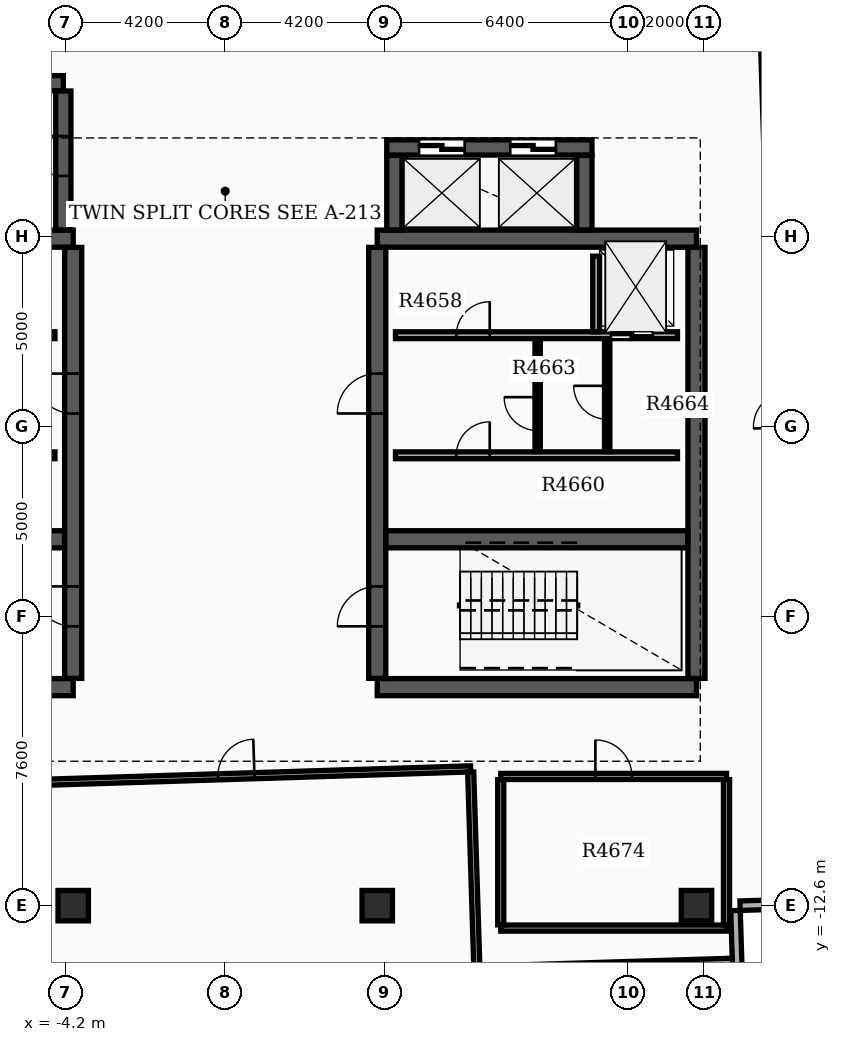
"""IFC4 building model, lengths in metres.
Left out: names, types, materials, properties, quantities, classifications, styles, units other than length and angle.
Written with IfcOpenShell. Run it as: python <this file> out.ifc"""

import sys

from ifc_helpers import new_model, si_unit, direction, frame, frame_2d, origin, origin_2d, place, context, subcontext, project, spatial, rectangle, extrude, element, fill, save


model = new_model("IFC4")
c1 = context("Model", 3, precision=1e-05, world=origin(), true_north=direction((0.0, 1.0)))
c2 = subcontext(c1, "Body", "Model", "MODEL_VIEW")
j1 = project(units=[si_unit("LENGTHUNIT", "METRE"), si_unit("PLANEANGLEUNIT", "RADIAN")], contexts=[c1])
p1 = place(None, origin())
s1 = spatial("IfcSite", under=j1, at=p1, CompositionType="ELEMENT")
p2 = place(p1, origin())
s2 = spatial("IfcBuilding", under=s1, at=p2, CompositionType="ELEMENT")
p3 = place(p2, frame((0.0, 0.0, 299.4)))
s3 = spatial("IfcBuildingStorey", under=s2, at=p3, CompositionType="ELEMENT", Elevation=299.4)
for number, where, z_axis, x_axis in (
    (1, (-12.4, -6.85, 0.0), (0.0, 0.0, 1.0), (1.0, 0.0, 0.0)),
    (2, (-12.4, 4.95, 0.0), (0.0, 0.0, 1.0), (1.0, 0.0, 0.0)),
):
    element("IfcWall", number, at=place(p3, frame(where, z_axis=z_axis, x_axis=x_axis)), inside=s3, PredefinedType="SHEAR", context=c2, shape_type="SweptSolid", body=[
        extrude(rectangle(XDim=8.4, YDim=0.45, at=frame_2d((4.2, 0.0))), origin(), (0.0, 0.0, 1.0), 4.25),
    ])
p4 = place(p3, frame((-4.0, -6.62, 0.0), z_axis=(0.0, 0.0, 1.0), x_axis=(0.0, 1.0, 0.0)))
e3 = element("IfcWall", 3, at=p4, inside=s3, PredefinedType="SHEAR", context=c2, shape_type="SweptSolid", body=[
    extrude(rectangle(XDim=11.34, YDim=0.45, at=frame_2d((5.67, 0.0))), origin(), (0.0, 0.0, 1.0), 4.25),
])
p5 = place(p4, frame((1.37, 0.0, 0.0)))
e4 = element("IfcOpeningElement", 4, at=p5, cuts=e3, PredefinedType="OPENING", context=c2, shape_type="SweptSolid", body=[
    extrude(rectangle(XDim=1.05, YDim=2.15, at=frame_2d((0.525, 1.075))), frame((0.0, 0.235, 0.0), z_axis=(0.0, -1.0, 0.0), x_axis=(1.0, 0.0, 0.0)), (0.0, 0.0, 1.0), 0.47),
])
p6 = place(p4, frame((6.97, 0.0, 0.0)))
e5 = element("IfcOpeningElement", 5, at=p6, cuts=e3, PredefinedType="OPENING", context=c2, shape_type="SweptSolid", body=[
    extrude(rectangle(XDim=1.05, YDim=2.15, at=frame_2d((0.525, 1.075))), frame((0.0, 0.235, 0.0), z_axis=(0.0, -1.0, 0.0), x_axis=(1.0, 0.0, 0.0)), (0.0, 0.0, 1.0), 0.47),
])
p7 = place(p3, frame((-12.17, -2.96, 0.0), z_axis=(0.0, 0.0, 1.0), x_axis=(1.0, 0.0, 0.0)))
e6 = element("IfcWall", 6, at=p7, inside=s3, PredefinedType="SHEAR", context=c2, shape_type="SweptSolid", body=[
    extrude(rectangle(XDim=7.94, YDim=0.45, at=frame_2d((3.97, 0.0))), origin(), (0.0, 0.0, 1.0), 4.25),
])
for number, where, z_axis, x_axis in (
    (7, (4.0, -6.85, 0.0), (0.0, 0.0, 1.0), (1.0, 0.0, 0.0)),
    (8, (4.0, 4.95, 0.0), (0.0, 0.0, 1.0), (1.0, 0.0, 0.0)),
):
    element("IfcWall", number, at=place(p3, frame(where, z_axis=z_axis, x_axis=x_axis)), inside=s3, PredefinedType="SHEAR", context=c2, shape_type="SweptSolid", body=[
        extrude(rectangle(XDim=8.4, YDim=0.45, at=frame_2d((4.2, 0.0))), origin(), (0.0, 0.0, 1.0), 4.25),
    ])
p8 = place(p3, frame((4.0, -6.62, 0.0), z_axis=(0.0, 0.0, 1.0), x_axis=(0.0, 1.0, 0.0)))
e9 = element("IfcWall", 9, at=p8, inside=s3, PredefinedType="SHEAR", context=c2, shape_type="SweptSolid", body=[
    extrude(rectangle(XDim=11.34, YDim=0.45, at=frame_2d((5.67, 0.0))), origin(), (0.0, 0.0, 1.0), 4.25),
])
p9 = place(p8, frame((1.37, 0.0, 0.0)))
e10 = element("IfcOpeningElement", 10, at=p9, cuts=e9, PredefinedType="OPENING", context=c2, shape_type="SweptSolid", body=[
    extrude(rectangle(XDim=1.05, YDim=2.15, at=frame_2d((0.525, 1.075))), frame((0.0, 0.235, 0.0), z_axis=(0.0, -1.0, 0.0), x_axis=(1.0, 0.0, 0.0)), (0.0, 0.0, 1.0), 0.47),
])
p10 = place(p8, frame((6.97, 0.0, 0.0)))
e11 = element("IfcOpeningElement", 11, at=p10, cuts=e9, PredefinedType="OPENING", context=c2, shape_type="SweptSolid", body=[
    extrude(rectangle(XDim=1.05, YDim=2.15, at=frame_2d((0.525, 1.075))), frame((0.0, 0.235, 0.0), z_axis=(0.0, -1.0, 0.0), x_axis=(1.0, 0.0, 0.0)), (0.0, 0.0, 1.0), 0.47),
])
p11 = place(p3, frame((12.4, -6.62, 0.0), z_axis=(0.0, 0.0, 1.0), x_axis=(0.0, 1.0, 0.0)))
e12 = element("IfcWall", 12, at=p11, inside=s3, PredefinedType="SHEAR", context=c2, shape_type="SweptSolid", body=[
    extrude(rectangle(XDim=11.34, YDim=0.45, at=frame_2d((5.67, 0.0))), origin(), (0.0, 0.0, 1.0), 4.25),
])
p12 = place(p3, frame((4.23, -2.96, 0.0), z_axis=(0.0, 0.0, 1.0), x_axis=(1.0, 0.0, 0.0)))
e13 = element("IfcWall", 13, at=p12, inside=s3, PredefinedType="SHEAR", context=c2, shape_type="SweptSolid", body=[
    extrude(rectangle(XDim=7.94, YDim=0.45, at=frame_2d((3.97, 0.0))), origin(), (0.0, 0.0, 1.0), 4.25),
])
p13 = place(p3, frame((-12.22, 9.04, 0.0), z_axis=(0.0, 0.0, 1.0), x_axis=(1.0, 0.0, 0.0)))
e14 = element("IfcWall", 14, at=p13, inside=s3, PredefinedType="SHEAR", context=c2, shape_type="SweptSolid", body=[
    extrude(rectangle(XDim=7.96, YDim=0.4, at=frame_2d((3.98, 0.0))), origin(), (0.0, 0.0, 1.0), 4.25),
])
p14 = place(p3, frame((-4.26, 5.18, 0.0), z_axis=(0.0, 0.0, 1.0), x_axis=(0.0, 1.0, 0.0)))
e15 = element("IfcWall", 15, at=p14, inside=s3, PredefinedType="SHEAR", context=c2, shape_type="SweptSolid", body=[
    extrude(rectangle(XDim=3.655, YDim=0.4, at=frame_2d((1.828, 0.0))), origin(), (0.0, 0.0, 1.0), 4.25),
])
p15 = place(p14, frame((1.42, 0.0, 0.0)))
e16 = element("IfcOpeningElement", 16, at=p15, cuts=e15, PredefinedType="OPENING", context=c2, shape_type="SweptSolid", body=[
    extrude(rectangle(XDim=1.05, YDim=2.15, at=frame_2d((0.525, 1.075))), frame((0.0, 0.21, 0.0), z_axis=(0.0, -1.0, 0.0), x_axis=(1.0, 0.0, 0.0)), (0.0, 0.0, 1.0), 0.42),
])
p16 = place(p3, frame((4.45, 5.18, 0.0), z_axis=(0.0, 0.0, 1.0), x_axis=(0.0, 1.0, 0.0)))
e17 = element("IfcWall", 17, at=p16, inside=s3, PredefinedType="SHEAR", context=c2, shape_type="SweptSolid", body=[
    extrude(rectangle(XDim=1.96, YDim=0.4, at=frame_2d((0.98, 0.0))), origin(), (0.0, 0.0, 1.0), 4.25),
])
p17 = place(p3, frame((4.25, 7.35, 0.0), z_axis=(0.0, 0.0, 1.0), x_axis=(1.0, 0.0, 0.0)))
e18 = element("IfcWall", 18, at=p17, inside=s3, PredefinedType="SHEAR", context=c2, shape_type="SweptSolid", body=[
    extrude(rectangle(XDim=5.4, YDim=0.4, at=frame_2d((2.7, 0.0))), origin(), (0.0, 0.0, 1.0), 4.25),
])
p18 = place(p17, frame((0.85, 0.0, 0.0)))
e19 = element("IfcOpeningElement", 19, at=p18, cuts=e18, PredefinedType="OPENING", context=c2, shape_type="SweptSolid", body=[
    extrude(rectangle(XDim=1.2, YDim=2.2, at=frame_2d((0.6, 1.1))), frame((0.0, 0.21, 0.0), z_axis=(0.0, -1.0, 0.0), x_axis=(1.0, 0.0, 0.0)), (0.0, 0.0, 1.0), 0.42),
])
p19 = place(p17, frame((3.25, 0.0, 0.0)))
e20 = element("IfcOpeningElement", 20, at=p19, cuts=e18, PredefinedType="OPENING", context=c2, shape_type="SweptSolid", body=[
    extrude(rectangle(XDim=1.2, YDim=2.2, at=frame_2d((0.6, 1.1))), frame((0.0, 0.21, 0.0), z_axis=(0.0, -1.0, 0.0), x_axis=(1.0, 0.0, 0.0)), (0.0, 0.0, 1.0), 0.42),
])
p20 = place(p3, frame((9.45, 5.18, 0.0), z_axis=(0.0, 0.0, 1.0), x_axis=(0.0, 1.0, 0.0)))
e21 = element("IfcWall", 21, at=p20, inside=s3, PredefinedType="SHEAR", context=c2, shape_type="SweptSolid", body=[
    extrude(rectangle(XDim=1.96, YDim=0.4, at=frame_2d((0.98, 0.0))), origin(), (0.0, 0.0, 1.0), 4.25),
])
for number, where, z_axis, x_axis in (
    (22, (12.4, -12.6, 0.0), (0.0, 0.0, 1.0), (1.0, 0.0, 0.0)),
    (23, (-4.0, -12.6, 0.0), (0.0, 0.0, 1.0), (1.0, 0.0, 0.0)),
    (24, (4.0, -12.6, 0.0), (0.0, 0.0, 1.0), (1.0, 0.0, 0.0)),
):
    element("IfcColumn", number, at=place(p3, frame(where, z_axis=z_axis, x_axis=x_axis)), inside=s3, PredefinedType="COLUMN", context=c2, shape_type="SweptSolid", body=[
        extrude(rectangle(XDim=0.8, YDim=0.8, at=origin_2d()), origin(), (0.0, 0.0, 1.0), 4.5),
    ])
p21 = place(p3, frame((14.315, 6.748, 0.0), z_axis=(0.0, 0.0, 1.0), x_axis=(-0.03143615455, 0.999505761958, 0.0)))
e25 = element("IfcWall", 25, at=p21, inside=s3, PredefinedType="STANDARD", context=c2, shape_type="SweptSolid", body=[
    extrude(rectangle(XDim=6.85, YDim=0.25, at=frame_2d((3.425, 0.0))), origin(), (0.0, 0.0, 1.0), 3.73),
])
p22 = place(p3, frame((14.797, -12.561, 0.0), z_axis=(0.0, 0.0, 1.0), x_axis=(-0.999505383482, -0.0314481858, 0.0)))
e26 = element("IfcWall", 26, at=p22, inside=s3, PredefinedType="STANDARD", context=c2, shape_type="SweptSolid", body=[
    extrude(rectangle(XDim=1.25, YDim=0.25, at=frame_2d((0.625, 0.0))), origin(), (0.0, 0.0, 1.0), 3.73),
])
p23 = place(p3, frame((13.427, -12.729, 0.0), z_axis=(0.0, 0.0, 1.0), x_axis=(0.031412596484, -0.999506502621, 0.0)))
e27 = element("IfcWall", 27, at=p23, inside=s3, PredefinedType="STANDARD", context=c2, shape_type="SweptSolid", body=[
    extrude(rectangle(XDim=1.5, YDim=0.25, at=frame_2d((0.75, 0.0))), origin(), (0.0, 0.0, 1.0), 3.73),
])
p24 = place(p3, frame((13.345, -14.108, 0.0), z_axis=(0.0, 0.0, 1.0), x_axis=(-0.999506546651, -0.031411195469, 0.0)))
e28 = element("IfcWall", 28, at=p24, inside=s3, PredefinedType="STANDARD", context=c2, shape_type="SweptSolid", body=[
    extrude(rectangle(XDim=6.35, YDim=0.25, at=frame_2d((3.175, 0.0))), origin(), (0.0, 0.0, 1.0), 3.73),
])
p25 = place(p3, frame((-11.9, 2.41, 0.0), z_axis=(0.0, 0.0, 1.0), x_axis=(1.0, 0.0, 0.0)))
e29 = element("IfcWall", 29, at=p25, inside=s3, PredefinedType="SOLIDWALL", context=c2, shape_type="SweptSolid", body=[
    extrude(rectangle(XDim=7.42, YDim=0.18, at=frame_2d((3.71, 0.0))), origin(), (0.0, 0.0, 1.0), 3.72),
])
p26 = place(p25, frame((0.55, 0.0, 0.0)))
e30 = element("IfcOpeningElement", 30, at=p26, cuts=e29, PredefinedType="OPENING", context=c2, shape_type="SweptSolid", body=[
    extrude(rectangle(XDim=1.1, YDim=2.15, at=frame_2d((0.55, 1.075))), frame((0.0, 0.1, 0.0), z_axis=(0.0, -1.0, 0.0), x_axis=(1.0, 0.0, 0.0)), (0.0, 0.0, 1.0), 0.2),
])
p27 = place(p25, frame((4.9, 0.0, 0.0)))
e31 = element("IfcOpeningElement", 31, at=p27, cuts=e29, PredefinedType="OPENING", context=c2, shape_type="SweptSolid", body=[
    extrude(rectangle(XDim=0.88, YDim=2.1, at=frame_2d((0.44, 1.05))), frame((0.0, 0.1, 0.0), z_axis=(0.0, -1.0, 0.0), x_axis=(1.0, 0.0, 0.0)), (0.0, 0.0, 1.0), 0.2),
])
p28 = place(p3, frame((4.48, 2.41, 0.0), z_axis=(0.0, 0.0, 1.0), x_axis=(1.0, 0.0, 0.0)))
e32 = element("IfcWall", 32, at=p28, inside=s3, PredefinedType="SOLIDWALL", context=c2, shape_type="SweptSolid", body=[
    extrude(rectangle(XDim=7.42, YDim=0.18, at=frame_2d((3.71, 0.0))), origin(), (0.0, 0.0, 1.0), 3.72),
])
p29 = place(p28, frame((5.67, 0.0, 0.0)))
e33 = element("IfcOpeningElement", 33, at=p29, cuts=e32, PredefinedType="OPENING", context=c2, shape_type="SweptSolid", body=[
    extrude(rectangle(XDim=1.1, YDim=2.15, at=frame_2d((0.55, 1.075))), frame((0.0, 0.1, 0.0), z_axis=(0.0, -1.0, 0.0), x_axis=(1.0, 0.0, 0.0)), (0.0, 0.0, 1.0), 0.2),
])
p30 = place(p28, frame((1.6, 0.0, 0.0)))
e34 = element("IfcOpeningElement", 34, at=p30, cuts=e32, PredefinedType="OPENING", context=c2, shape_type="SweptSolid", body=[
    extrude(rectangle(XDim=0.88, YDim=2.1, at=frame_2d((0.44, 1.05))), frame((0.0, 0.1, 0.0), z_axis=(0.0, -1.0, 0.0), x_axis=(1.0, 0.0, 0.0)), (0.0, 0.0, 1.0), 0.2),
])
p31 = place(p3, frame((-11.9, -0.75, 0.0), z_axis=(0.0, 0.0, 1.0), x_axis=(1.0, 0.0, 0.0)))
e35 = element("IfcWall", 35, at=p31, inside=s3, PredefinedType="SOLIDWALL", context=c2, shape_type="SweptSolid", body=[
    extrude(rectangle(XDim=7.42, YDim=0.18, at=frame_2d((3.71, 0.0))), origin(), (0.0, 0.0, 1.0), 3.72),
])
p32 = place(p31, frame((1.6, 0.0, 0.0)))
e36 = element("IfcOpeningElement", 36, at=p32, cuts=e35, PredefinedType="OPENING", context=c2, shape_type="SweptSolid", body=[
    extrude(rectangle(XDim=0.88, YDim=2.1, at=frame_2d((0.44, 1.05))), frame((0.0, 0.1, 0.0), z_axis=(0.0, -1.0, 0.0), x_axis=(1.0, 0.0, 0.0)), (0.0, 0.0, 1.0), 0.2),
])
p33 = place(p3, frame((4.48, -0.75, 0.0), z_axis=(0.0, 0.0, 1.0), x_axis=(1.0, 0.0, 0.0)))
e37 = element("IfcWall", 37, at=p33, inside=s3, PredefinedType="SOLIDWALL", context=c2, shape_type="SweptSolid", body=[
    extrude(rectangle(XDim=7.42, YDim=0.18, at=frame_2d((3.71, 0.0))), origin(), (0.0, 0.0, 1.0), 3.72),
])
p34 = place(p33, frame((1.6, 0.0, 0.0)))
e38 = element("IfcOpeningElement", 38, at=p34, cuts=e37, PredefinedType="OPENING", context=c2, shape_type="SweptSolid", body=[
    extrude(rectangle(XDim=0.88, YDim=2.1, at=frame_2d((0.44, 1.05))), frame((0.0, 0.1, 0.0), z_axis=(0.0, -1.0, 0.0), x_axis=(1.0, 0.0, 0.0)), (0.0, 0.0, 1.0), 0.2),
])
p35 = place(p3, frame((9.76, 2.5, 0.0), z_axis=(0.0, 0.0, 1.0), x_axis=(0.0, 1.0, 0.0)))
e39 = element("IfcWall", 39, at=p35, inside=s3, PredefinedType="SOLIDWALL", context=c2, shape_type="SweptSolid", body=[
    extrude(rectangle(XDim=1.99, YDim=0.18, at=frame_2d((0.995, 0.0))), origin(), (0.0, 0.0, 1.0), 3.72),
])
p36 = place(p3, frame((8.22, -0.65, 0.0), z_axis=(0.0, 0.0, 1.0), x_axis=(0.0, 1.0, 0.0)))
e40 = element("IfcWall", 40, at=p36, inside=s3, PredefinedType="SOLIDWALL", context=c2, shape_type="SweptSolid", body=[
    extrude(rectangle(XDim=2.96, YDim=0.14, at=frame_2d((1.48, 0.0))), origin(), (0.0, 0.0, 1.0), 3.72),
])
p37 = place(p36, frame((0.55, 0.0, 0.0)))
e41 = element("IfcOpeningElement", 41, at=p37, cuts=e40, PredefinedType="OPENING", context=c2, shape_type="SweptSolid", body=[
    extrude(rectangle(XDim=0.88, YDim=2.1, at=frame_2d((0.44, 1.05))), frame((0.0, 0.08, 0.0), z_axis=(0.0, -1.0, 0.0), x_axis=(1.0, 0.0, 0.0)), (0.0, 0.0, 1.0), 0.16),
])
p38 = place(p3, frame((10.05, -0.652, 0.0), z_axis=(0.0, 0.0, 1.0), x_axis=(0.0, 1.0, 0.0)))
e42 = element("IfcWall", 42, at=p38, inside=s3, PredefinedType="PARTITIONING", context=c2, shape_type="SweptSolid", body=[
    extrude(rectangle(XDim=2.962, YDim=0.14, at=frame_2d((1.481, 0.0))), origin(), (0.0, 0.0, 1.0), 3.72),
])
p39 = place(p38, frame((0.85, 0.0, 0.0)))
e43 = element("IfcOpeningElement", 43, at=p39, cuts=e42, PredefinedType="OPENING", context=c2, shape_type="SweptSolid", body=[
    extrude(rectangle(XDim=0.88, YDim=2.1, at=frame_2d((0.44, 1.05))), frame((0.0, 0.08, 0.0), z_axis=(0.0, -1.0, 0.0), x_axis=(1.0, 0.0, 0.0)), (0.0, 0.0, 1.0), 0.16),
])
p40 = place(p3, frame((-5.878, -9.389, 0.0), z_axis=(0.0, 0.0, 1.0), x_axis=(0.999506326497, 0.031418200013, 0.0)))
e44 = element("IfcWall", 44, at=p40, inside=s3, PredefinedType="PARTITIONING", context=c2, shape_type="SweptSolid", body=[
    extrude(rectangle(XDim=12.34, YDim=0.16, at=frame_2d((6.17, 0.0))), origin(), (0.0, 0.0, 1.0), 3.72),
])
p41 = place(p40, frame((5.69, 0.0, 0.0)))
e45 = element("IfcOpeningElement", 45, at=p41, cuts=e44, PredefinedType="OPENING", context=c2, shape_type="SweptSolid", body=[
    extrude(rectangle(XDim=0.96, YDim=2.15, at=frame_2d((0.48, 1.075))), frame((0.0, 0.09, 0.0), z_axis=(0.0, -1.0, 0.0), x_axis=(1.0, 0.0, 0.0)), (0.0, 0.0, 1.0), 0.18),
])
p42 = place(p3, frame((6.966, -25.24, 0.0), z_axis=(0.0, 0.0, 1.0), x_axis=(-0.031420563501, 0.999506252201, 0.0)))
e46 = element("IfcWall", 46, at=p42, inside=s3, PredefinedType="PARTITIONING", context=c2, shape_type="SweptSolid", body=[
    extrude(rectangle(XDim=16.162, YDim=0.16, at=frame_2d((8.081, 0.0))), origin(), (0.0, 0.0, 1.0), 3.72),
])
p43 = place(p3, frame((7.25, -13.19, 0.0), z_axis=(0.0, 0.0, 1.0), x_axis=(1.0, 0.0, 0.0)))
e47 = element("IfcWall", 47, at=p43, inside=s3, PredefinedType="PARTITIONING", context=c2, shape_type="SweptSolid", body=[
    extrude(rectangle(XDim=5.94, YDim=0.16, at=frame_2d((2.97, 0.0))), origin(), (0.0, 0.0, 1.0), 3.72),
])
p44 = place(p3, frame((7.25, -9.2, 0.0), z_axis=(0.0, 0.0, 1.0), x_axis=(1.0, 0.0, 0.0)))
e48 = element("IfcWall", 48, at=p44, inside=s3, PredefinedType="PARTITIONING", context=c2, shape_type="SweptSolid", body=[
    extrude(rectangle(XDim=5.94, YDim=0.16, at=frame_2d((2.97, 0.0))), origin(), (0.0, 0.0, 1.0), 3.72),
])
p45 = place(p44, frame((2.49, 0.0, 0.0)))
e49 = element("IfcOpeningElement", 49, at=p45, cuts=e48, PredefinedType="OPENING", context=c2, shape_type="SweptSolid", body=[
    extrude(rectangle(XDim=0.96, YDim=2.15, at=frame_2d((0.48, 1.075))), frame((0.0, 0.09, 0.0), z_axis=(0.0, -1.0, 0.0), x_axis=(1.0, 0.0, 0.0)), (0.0, 0.0, 1.0), 0.18),
])
for number, where, z_axis, x_axis in (
    (50, (7.25, -13.105, 0.0), (0.0, 0.0, 1.0), (0.0, 1.0, 0.0)),
    (51, (13.19, -13.105, 0.0), (0.0, 0.0, 1.0), (0.0, 1.0, 0.0)),
):
    element("IfcWall", number, at=place(p3, frame(where, z_axis=z_axis, x_axis=x_axis)), inside=s3, PredefinedType="PARTITIONING", context=c2, shape_type="SweptSolid", body=[
        extrude(rectangle(XDim=3.82, YDim=0.16, at=frame_2d((1.91, 0.0))), origin(), (0.0, 0.0, 1.0), 3.72),
    ])
p46 = place(p5, origin())
e52 = element("IfcDoor", 52, at=p46, inside=s3, OperationType="SINGLE_SWING_RIGHT", PredefinedType="DOOR", context=c2, shape_type="SweptSolid", body=[
    extrude(rectangle(XDim=1.05, YDim=2.15, at=frame_2d((0.525, 1.075))), frame((0.0, 0.025, 0.0), z_axis=(0.0, -1.0, 0.0), x_axis=(1.0, 0.0, 0.0)), (0.0, 0.0, 1.0), 0.05),
])
fill(e4, e52)
p47 = place(p9, origin())
e53 = element("IfcDoor", 53, at=p47, inside=s3, OperationType="SINGLE_SWING_LEFT", PredefinedType="DOOR", context=c2, shape_type="SweptSolid", body=[
    extrude(rectangle(XDim=1.05, YDim=2.15, at=frame_2d((0.525, 1.075))), frame((0.0, 0.025, 0.0), z_axis=(0.0, -1.0, 0.0), x_axis=(1.0, 0.0, 0.0)), (0.0, 0.0, 1.0), 0.05),
])
fill(e10, e53)
p48 = place(p6, origin())
e54 = element("IfcDoor", 54, at=p48, inside=s3, OperationType="SINGLE_SWING_RIGHT", PredefinedType="DOOR", context=c2, shape_type="SweptSolid", body=[
    extrude(rectangle(XDim=1.05, YDim=2.15, at=frame_2d((0.525, 1.075))), frame((0.0, 0.025, 0.0), z_axis=(0.0, -1.0, 0.0), x_axis=(1.0, 0.0, 0.0)), (0.0, 0.0, 1.0), 0.05),
])
fill(e5, e54)
p49 = place(p10, origin())
e55 = element("IfcDoor", 55, at=p49, inside=s3, OperationType="SINGLE_SWING_LEFT", PredefinedType="DOOR", context=c2, shape_type="SweptSolid", body=[
    extrude(rectangle(XDim=1.05, YDim=2.15, at=frame_2d((0.525, 1.075))), frame((0.0, 0.025, 0.0), z_axis=(0.0, -1.0, 0.0), x_axis=(1.0, 0.0, 0.0)), (0.0, 0.0, 1.0), 0.05),
])
fill(e11, e55)
p50 = place(p15, origin())
e56 = element("IfcDoor", 56, at=p50, inside=s3, OperationType="SINGLE_SWING_RIGHT", PredefinedType="DOOR", context=c2, shape_type="SweptSolid", body=[
    extrude(rectangle(XDim=1.05, YDim=2.15, at=frame_2d((0.525, 1.075))), frame((0.0, 0.025, 0.0), z_axis=(0.0, -1.0, 0.0), x_axis=(1.0, 0.0, 0.0)), (0.0, 0.0, 1.0), 0.05),
])
fill(e16, e56)
p51 = place(p29, origin())
e57 = element("IfcDoor", 57, at=p51, inside=s3, OperationType="DOUBLE_DOOR_SLIDING", PredefinedType="DOOR", context=c2, shape_type="SweptSolid", body=[
    extrude(rectangle(XDim=1.1, YDim=2.15, at=frame_2d((0.55, 1.075))), frame((0.0, 0.025, 0.0), z_axis=(0.0, -1.0, 0.0), x_axis=(1.0, 0.0, 0.0)), (0.0, 0.0, 1.0), 0.05),
])
fill(e33, e57)
p52 = place(p18, origin())
e58 = element("IfcDoor", 58, at=p52, inside=s3, OperationType="DOUBLE_DOOR_SLIDING", PredefinedType="DOOR", context=c2, shape_type="SweptSolid", body=[
    extrude(rectangle(XDim=1.2, YDim=2.2, at=frame_2d((0.6, 1.1))), frame((0.0, 0.025, 0.0), z_axis=(0.0, -1.0, 0.0), x_axis=(1.0, 0.0, 0.0)), (0.0, 0.0, 1.0), 0.05),
])
fill(e19, e58)
p53 = place(p19, origin())
e59 = element("IfcDoor", 59, at=p53, inside=s3, OperationType="DOUBLE_DOOR_SLIDING", PredefinedType="DOOR", context=c2, shape_type="SweptSolid", body=[
    extrude(rectangle(XDim=1.2, YDim=2.2, at=frame_2d((0.6, 1.1))), frame((0.0, 0.025, 0.0), z_axis=(0.0, -1.0, 0.0), x_axis=(1.0, 0.0, 0.0)), (0.0, 0.0, 1.0), 0.05),
])
fill(e20, e59)
p54 = place(p30, origin())
e60 = element("IfcDoor", 60, at=p54, inside=s3, OperationType="SINGLE_SWING_RIGHT", PredefinedType="DOOR", context=c2, shape_type="SweptSolid", body=[
    extrude(rectangle(XDim=0.88, YDim=2.1, at=frame_2d((0.44, 1.05))), frame((0.0, 0.025, 0.0), z_axis=(0.0, -1.0, 0.0), x_axis=(1.0, 0.0, 0.0)), (0.0, 0.0, 1.0), 0.05),
])
fill(e34, e60)
p55 = place(p34, origin())
e61 = element("IfcDoor", 61, at=p55, inside=s3, OperationType="SINGLE_SWING_RIGHT", PredefinedType="DOOR", context=c2, shape_type="SweptSolid", body=[
    extrude(rectangle(XDim=0.88, YDim=2.1, at=frame_2d((0.44, 1.05))), frame((0.0, 0.025, 0.0), z_axis=(0.0, -1.0, 0.0), x_axis=(1.0, 0.0, 0.0)), (0.0, 0.0, 1.0), 0.05),
])
fill(e38, e61)
p56 = place(p37, origin())
e62 = element("IfcDoor", 62, at=p56, inside=s3, OperationType="SINGLE_SWING_RIGHT", PredefinedType="DOOR", context=c2, shape_type="SweptSolid", body=[
    extrude(rectangle(XDim=0.88, YDim=2.1, at=frame_2d((0.44, 1.05))), frame((0.0, 0.025, 0.0), z_axis=(0.0, -1.0, 0.0), x_axis=(1.0, 0.0, 0.0)), (0.0, 0.0, 1.0), 0.05),
])
fill(e41, e62)
p57 = place(p39, origin())
e63 = element("IfcDoor", 63, at=p57, inside=s3, OperationType="SINGLE_SWING_RIGHT", PredefinedType="DOOR", context=c2, shape_type="SweptSolid", body=[
    extrude(rectangle(XDim=0.88, YDim=2.1, at=frame_2d((0.44, 1.05))), frame((0.0, 0.025, 0.0), z_axis=(0.0, -1.0, 0.0), x_axis=(1.0, 0.0, 0.0)), (0.0, 0.0, 1.0), 0.05),
])
fill(e43, e63)
p58 = place(p41, origin())
e64 = element("IfcDoor", 64, at=p58, inside=s3, OperationType="SINGLE_SWING_RIGHT", PredefinedType="DOOR", context=c2, shape_type="SweptSolid", body=[
    extrude(rectangle(XDim=0.96, YDim=2.15, at=frame_2d((0.48, 1.075))), frame((0.0, 0.025, 0.0), z_axis=(0.0, -1.0, 0.0), x_axis=(1.0, 0.0, 0.0)), (0.0, 0.0, 1.0), 0.05),
])
fill(e45, e64)
p59 = place(p45, origin())
e65 = element("IfcDoor", 65, at=p59, inside=s3, OperationType="SINGLE_SWING_LEFT", PredefinedType="DOOR", context=c2, shape_type="SweptSolid", body=[
    extrude(rectangle(XDim=0.96, YDim=2.15, at=frame_2d((0.48, 1.075))), frame((0.0, 0.025, 0.0), z_axis=(0.0, -1.0, 0.0), x_axis=(1.0, 0.0, 0.0)), (0.0, 0.0, 1.0), 0.05),
])
fill(e49, e65)
save(model, sys.argv[1])
